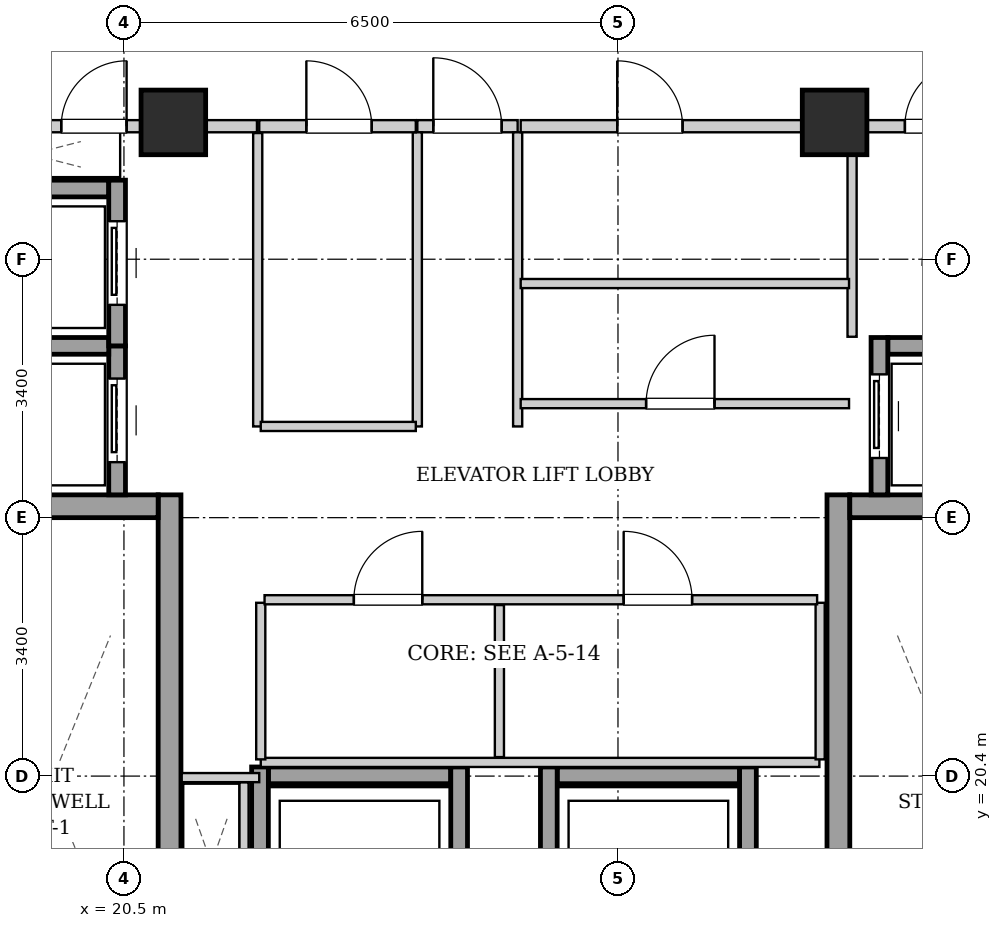
"""IFC4 building model, lengths in metres.
Left out: names, types, materials, properties, quantities, classifications, styles, units other than length and angle.
Written with IfcOpenShell. Run it as: python <this file> out.ifc"""

import sys

from ifc_helpers import new_model, si_unit, direction, frame, frame_2d, origin, origin_2d, place, context, subcontext, project, spatial, rectangle, extrude, element, fill, save


model = new_model("IFC4")
c1 = context("Model", 3, precision=1e-05, world=origin(), true_north=direction((0.0, 1.0)))
c2 = subcontext(c1, "Body", "Model", "MODEL_VIEW")
j1 = project(units=[si_unit("LENGTHUNIT", "METRE"), si_unit("PLANEANGLEUNIT", "RADIAN")], contexts=[c1])
p1 = place(None, origin())
s1 = spatial("IfcSite", under=j1, at=p1, CompositionType="ELEMENT")
p2 = place(p1, origin())
s2 = spatial("IfcBuilding", under=s1, at=p2, CompositionType="ELEMENT")
p3 = place(p2, frame((0.0, 0.0, 210.7)))
s3 = spatial("IfcBuildingStorey", under=s2, at=p3, CompositionType="ELEMENT", Elevation=210.7)
for number, where, z_axis, x_axis in (
    (1, (21.15, 29.0, 0.0), (0.0, 0.0, 1.0), (1.0, 0.0, 0.0)),
    (2, (29.85, 29.0, 0.0), (0.0, 0.0, 1.0), (1.0, 0.0, 0.0)),
):
    element("IfcColumn", number, at=place(p3, frame(where, z_axis=z_axis, x_axis=x_axis)), inside=s3, PredefinedType="COLUMN", context=c2, shape_type="SweptSolid", body=[
        extrude(rectangle(XDim=0.85, YDim=0.85, at=origin_2d()), origin(), (0.0, 0.0, 1.0), 3.3),
    ])
p4 = place(p3, frame((21.1, 15.1, 0.0), z_axis=(0.0, 0.0, 1.0), x_axis=(0.0, 1.0, 0.0)))
e3 = element("IfcWall", 3, at=p4, inside=s3, PredefinedType="SHEAR", context=c2, shape_type="SweptSolid", body=[
    extrude(rectangle(XDim=9.0, YDim=0.3, at=frame_2d((4.5, 0.0))), origin(), (0.0, 0.0, 1.0), 3.04),
])
p5 = place(p3, frame((18.1, 23.95, 0.0), z_axis=(0.0, 0.0, 1.0), x_axis=(1.0, 0.0, 0.0)))
e4 = element("IfcWall", 4, at=p5, inside=s3, PredefinedType="SHEAR", context=c2, shape_type="SweptSolid", body=[
    extrude(rectangle(XDim=2.85, YDim=0.3, at=frame_2d((1.425, 0.0))), origin(), (0.0, 0.0, 1.0), 3.04),
])
p6 = place(p3, frame((29.9, 15.1, 0.0), z_axis=(0.0, 0.0, 1.0), x_axis=(0.0, 1.0, 0.0)))
e5 = element("IfcWall", 5, at=p6, inside=s3, PredefinedType="SHEAR", context=c2, shape_type="SweptSolid", body=[
    extrude(rectangle(XDim=9.0, YDim=0.3, at=frame_2d((4.5, 0.0))), origin(), (0.0, 0.0, 1.0), 3.04),
])
p7 = place(p3, frame((30.05, 23.95, 0.0), z_axis=(0.0, 0.0, 1.0), x_axis=(1.0, 0.0, 0.0)))
e6 = element("IfcWall", 6, at=p7, inside=s3, PredefinedType="SHEAR", context=c2, shape_type="SweptSolid", body=[
    extrude(rectangle(XDim=2.85, YDim=0.3, at=frame_2d((1.425, 0.0))), origin(), (0.0, 0.0, 1.0), 3.04),
])
p8 = place(p3, frame((20.41, 24.1, 0.0), z_axis=(0.0, 0.0, 1.0), x_axis=(0.0, 1.0, 0.0)))
e7 = element("IfcWall", 7, at=p8, inside=s3, PredefinedType="SHEAR", context=c2, shape_type="SweptSolid", body=[
    extrude(rectangle(XDim=1.96, YDim=0.22, at=frame_2d((0.98, 0.0))), origin(), (0.0, 0.0, 1.0), 3.04),
])
p9 = place(p8, frame((0.43, 0.0, 0.0)))
e8 = element("IfcOpeningElement", 8, at=p9, cuts=e7, PredefinedType="OPENING", context=c2, shape_type="SweptSolid", body=[
    extrude(rectangle(XDim=1.1, YDim=2.15, at=frame_2d((0.55, 1.075))), frame((0.0, 0.12, 0.0), z_axis=(0.0, -1.0, 0.0), x_axis=(1.0, 0.0, 0.0)), (0.0, 0.0, 1.0), 0.24),
])
for number, where, z_axis, x_axis in (
    (9, (18.4, 26.06, 0.0), (0.0, 0.0, 1.0), (1.0, 0.0, 0.0)),
    (10, (18.4, 28.13, 0.0), (0.0, 0.0, 1.0), (1.0, 0.0, 0.0)),
):
    element("IfcWall", number, at=place(p3, frame(where, z_axis=z_axis, x_axis=x_axis)), inside=s3, PredefinedType="SHEAR", context=c2, shape_type="SweptSolid", body=[
        extrude(rectangle(XDim=1.9, YDim=0.22, at=frame_2d((0.95, 0.0))), origin(), (0.0, 0.0, 1.0), 3.04),
    ])
p10 = place(p3, frame((20.41, 26.06, 0.0), z_axis=(0.0, 0.0, 1.0), x_axis=(0.0, 1.0, 0.0)))
e11 = element("IfcWall", 11, at=p10, inside=s3, PredefinedType="SHEAR", context=c2, shape_type="SweptSolid", body=[
    extrude(rectangle(XDim=2.18, YDim=0.22, at=frame_2d((1.09, 0.0))), origin(), (0.0, 0.0, 1.0), 3.04),
])
p11 = place(p10, frame((0.54, 0.0, 0.0)))
e12 = element("IfcOpeningElement", 12, at=p11, cuts=e11, PredefinedType="OPENING", context=c2, shape_type="SweptSolid", body=[
    extrude(rectangle(XDim=1.1, YDim=2.15, at=frame_2d((0.55, 1.075))), frame((0.0, 0.12, 0.0), z_axis=(0.0, -1.0, 0.0), x_axis=(1.0, 0.0, 0.0)), (0.0, 0.0, 1.0), 0.24),
])
p12 = place(p3, frame((30.55, 26.06, 0.0), z_axis=(0.0, 0.0, 1.0), x_axis=(1.0, 0.0, 0.0)))
e13 = element("IfcWall", 13, at=p12, inside=s3, PredefinedType="SHEAR", context=c2, shape_type="SweptSolid", body=[
    extrude(rectangle(XDim=1.9, YDim=0.22, at=frame_2d((0.95, 0.0))), origin(), (0.0, 0.0, 1.0), 3.04),
])
p13 = place(p3, frame((30.44, 24.1, 0.0), z_axis=(0.0, 0.0, 1.0), x_axis=(0.0, 1.0, 0.0)))
e14 = element("IfcWall", 14, at=p13, inside=s3, PredefinedType="SHEAR", context=c2, shape_type="SweptSolid", body=[
    extrude(rectangle(XDim=2.07, YDim=0.22, at=frame_2d((1.035, 0.0))), origin(), (0.0, 0.0, 1.0), 3.04),
])
p14 = place(p13, frame((0.485, 0.0, 0.0)))
e15 = element("IfcOpeningElement", 15, at=p14, cuts=e14, PredefinedType="OPENING", context=c2, shape_type="SweptSolid", body=[
    extrude(rectangle(XDim=1.1, YDim=2.15, at=frame_2d((0.55, 1.075))), frame((0.0, 0.12, 0.0), z_axis=(0.0, -1.0, 0.0), x_axis=(1.0, 0.0, 0.0)), (0.0, 0.0, 1.0), 0.24),
])
p15 = place(p3, frame((22.4, 20.41, 0.0), z_axis=(0.0, 0.0, 1.0), x_axis=(1.0, 0.0, 0.0)))
e16 = element("IfcWall", 16, at=p15, inside=s3, PredefinedType="SHEAR", context=c2, shape_type="SweptSolid", body=[
    extrude(rectangle(XDim=2.4, YDim=0.22, at=frame_2d((1.2, 0.0))), origin(), (0.0, 0.0, 1.0), 3.04),
])
for number, where, z_axis, x_axis in (
    (17, (22.29, 17.98, 0.0), (0.0, 0.0, 1.0), (0.0, 1.0, 0.0)),
    (18, (24.91, 17.98, 0.0), (0.0, 0.0, 1.0), (0.0, 1.0, 0.0)),
):
    element("IfcWall", number, at=place(p3, frame(where, z_axis=z_axis, x_axis=x_axis)), inside=s3, PredefinedType="SHEAR", context=c2, shape_type="SweptSolid", body=[
        extrude(rectangle(XDim=2.54, YDim=0.22, at=frame_2d((1.27, 0.0))), origin(), (0.0, 0.0, 1.0), 3.04),
    ])
p16 = place(p3, frame((26.2, 20.41, 0.0), z_axis=(0.0, 0.0, 1.0), x_axis=(1.0, 0.0, 0.0)))
e19 = element("IfcWall", 19, at=p16, inside=s3, PredefinedType="SHEAR", context=c2, shape_type="SweptSolid", body=[
    extrude(rectangle(XDim=2.4, YDim=0.22, at=frame_2d((1.2, 0.0))), origin(), (0.0, 0.0, 1.0), 3.04),
])
for number, where, z_axis, x_axis in (
    (20, (26.09, 17.98, 0.0), (0.0, 0.0, 1.0), (0.0, 1.0, 0.0)),
    (21, (28.71, 17.98, 0.0), (0.0, 0.0, 1.0), (0.0, 1.0, 0.0)),
):
    element("IfcWall", number, at=place(p3, frame(where, z_axis=z_axis, x_axis=x_axis)), inside=s3, PredefinedType="SHEAR", context=c2, shape_type="SweptSolid", body=[
        extrude(rectangle(XDim=2.54, YDim=0.22, at=frame_2d((1.27, 0.0))), origin(), (0.0, 0.0, 1.0), 3.04),
    ])
p17 = place(p3, frame((24.36, 28.95, 0.0), z_axis=(0.0, 0.0, 1.0), x_axis=(1.0, 0.0, 0.0)))
e22 = element("IfcWall", 22, at=p17, inside=s3, PredefinedType="PARTITIONING", context=c2, shape_type="SweptSolid", body=[
    extrude(rectangle(XDim=1.32, YDim=0.16, at=frame_2d((0.66, 0.0))), origin(), (0.0, 0.0, 1.0), 2.556),
])
p18 = place(p17, frame((0.21, 0.0, 0.0)))
e23 = element("IfcOpeningElement", 23, at=p18, cuts=e22, PredefinedType="OPENING", context=c2, shape_type="SweptSolid", body=[
    extrude(rectangle(XDim=0.9, YDim=2.05, at=frame_2d((0.45, 1.025))), frame((0.0, 0.09, 0.0), z_axis=(0.0, -1.0, 0.0), x_axis=(1.0, 0.0, 0.0)), (0.0, 0.0, 1.0), 0.18),
])
p19 = place(p3, frame((17.96, 28.95, 0.0), z_axis=(0.0, 0.0, 1.0), x_axis=(1.0, 0.0, 0.0)))
e24 = element("IfcWall", 24, at=p19, inside=s3, PredefinedType="PARTITIONING", context=c2, shape_type="SweptSolid", body=[
    extrude(rectangle(XDim=4.29, YDim=0.16, at=frame_2d((2.145, 0.0))), origin(), (0.0, 0.0, 1.0), 2.556),
])
p20 = place(p19, frame((1.715, 0.0, 0.0)))
e25 = element("IfcOpeningElement", 25, at=p20, cuts=e24, PredefinedType="OPENING", context=c2, shape_type="SweptSolid", body=[
    extrude(rectangle(XDim=0.86, YDim=2.05, at=frame_2d((0.43, 1.025))), frame((0.0, 0.09, 0.0), z_axis=(0.0, -1.0, 0.0), x_axis=(1.0, 0.0, 0.0)), (0.0, 0.0, 1.0), 0.18),
])
p21 = place(p3, frame((22.08, 18.2, 0.0), z_axis=(0.0, 0.0, 1.0), x_axis=(0.0, 1.0, 0.0)))
e26 = element("IfcWall", 26, at=p21, inside=s3, PredefinedType="PARTITIONING", context=c2, shape_type="SweptSolid", body=[
    extrude(rectangle(XDim=2.12, YDim=0.12, at=frame_2d((1.06, 0.0))), origin(), (0.0, 0.0, 1.0), 3.04),
])
p22 = place(p3, frame((22.28, 20.38, 0.0), z_axis=(0.0, 0.0, 1.0), x_axis=(-1.0, 0.0, 0.0)))
e27 = element("IfcWall", 27, at=p22, inside=s3, PredefinedType="PARTITIONING", context=c2, shape_type="SweptSolid", body=[
    extrude(rectangle(XDim=1.02, YDim=0.12, at=frame_2d((0.51, 0.0))), origin(), (0.0, 0.0, 1.0), 3.04),
])
for number, where, z_axis, x_axis in (
    (28, (24.36, 25.0, 0.0), (0.0, 0.0, 1.0), (0.0, 1.0, 0.0)),
    (29, (25.68, 25.0, 0.0), (0.0, 0.0, 1.0), (0.0, 1.0, 0.0)),
):
    element("IfcWall", number, at=place(p3, frame(where, z_axis=z_axis, x_axis=x_axis)), inside=s3, PredefinedType="PARTITIONING", context=c2, shape_type="SweptSolid", body=[
        extrude(rectangle(XDim=3.87, YDim=0.12, at=frame_2d((1.935, 0.0))), origin(), (0.0, 0.0, 1.0), 3.04),
    ])
p23 = place(p3, frame((30.08, 26.18, 0.0), z_axis=(0.0, 0.0, 1.0), x_axis=(0.0, 1.0, 0.0)))
e30 = element("IfcWall", 30, at=p23, inside=s3, PredefinedType="PARTITIONING", context=c2, shape_type="SweptSolid", body=[
    extrude(rectangle(XDim=2.68, YDim=0.12, at=frame_2d((1.34, 0.0))), origin(), (0.0, 0.0, 1.0), 3.04),
])
p24 = place(p3, frame((30.08, 28.95, 0.0), z_axis=(0.0, 0.0, 1.0), x_axis=(1.0, 0.0, 0.0)))
e31 = element("IfcWall", 31, at=p24, inside=s3, PredefinedType="PARTITIONING", context=c2, shape_type="SweptSolid", body=[
    extrude(rectangle(XDim=2.96, YDim=0.16, at=frame_2d((1.48, 0.0))), origin(), (0.0, 0.0, 1.0), 3.04),
])
p25 = place(p24, frame((0.695, 0.0, 0.0)))
e32 = element("IfcOpeningElement", 32, at=p25, cuts=e31, PredefinedType="OPENING", context=c2, shape_type="SweptSolid", body=[
    extrude(rectangle(XDim=0.86, YDim=2.05, at=frame_2d((0.43, 1.025))), frame((0.0, 0.09, 0.0), z_axis=(0.0, -1.0, 0.0), x_axis=(1.0, 0.0, 0.0)), (0.0, 0.0, 1.0), 0.18),
])
p26 = place(p3, frame((22.26, 25.0, 0.0), z_axis=(0.0, 0.0, 1.0), x_axis=(0.0, 1.0, 0.0)))
e33 = element("IfcWall", 33, at=p26, inside=s3, PredefinedType="PARTITIONING", context=c2, shape_type="SweptSolid", body=[
    extrude(rectangle(XDim=3.86, YDim=0.12, at=frame_2d((1.93, 0.0))), origin(), (0.0, 0.0, 1.0), 3.04),
])
p27 = place(p3, frame((22.3, 25.0, 0.0), z_axis=(0.0, 0.0, 1.0), x_axis=(1.0, 0.0, 0.0)))
e34 = element("IfcWall", 34, at=p27, inside=s3, PredefinedType="PARTITIONING", context=c2, shape_type="SweptSolid", body=[
    extrude(rectangle(XDim=2.04, YDim=0.12, at=frame_2d((1.02, 0.0))), origin(), (0.0, 0.0, 1.0), 3.04),
])
p28 = place(p3, frame((22.28, 28.95, 0.0), z_axis=(0.0, 0.0, 1.0), x_axis=(1.0, 0.0, 0.0)))
e35 = element("IfcWall", 35, at=p28, inside=s3, PredefinedType="PARTITIONING", context=c2, shape_type="SweptSolid", body=[
    extrude(rectangle(XDim=2.06, YDim=0.16, at=frame_2d((1.03, 0.0))), origin(), (0.0, 0.0, 1.0), 2.556),
])
p29 = place(p28, frame((0.62, 0.0, 0.0)))
e36 = element("IfcOpeningElement", 36, at=p29, cuts=e35, PredefinedType="OPENING", context=c2, shape_type="SweptSolid", body=[
    extrude(rectangle(XDim=0.86, YDim=2.05, at=frame_2d((0.43, 1.025))), frame((0.0, 0.09, 0.0), z_axis=(0.0, -1.0, 0.0), x_axis=(1.0, 0.0, 0.0)), (0.0, 0.0, 1.0), 0.18),
])
p30 = place(p3, frame((25.72, 26.88, 0.0), z_axis=(0.0, 0.0, 1.0), x_axis=(1.0, 0.0, 0.0)))
e37 = element("IfcWall", 37, at=p30, inside=s3, PredefinedType="PARTITIONING", context=c2, shape_type="SweptSolid", body=[
    extrude(rectangle(XDim=4.32, YDim=0.12, at=frame_2d((2.16, 0.0))), origin(), (0.0, 0.0, 1.0), 3.04),
])
p31 = place(p3, frame((25.72, 25.3, 0.0), z_axis=(0.0, 0.0, 1.0), x_axis=(1.0, 0.0, 0.0)))
e38 = element("IfcWall", 38, at=p31, inside=s3, PredefinedType="PARTITIONING", context=c2, shape_type="SweptSolid", body=[
    extrude(rectangle(XDim=4.32, YDim=0.12, at=frame_2d((2.16, 0.0))), origin(), (0.0, 0.0, 1.0), 3.04),
])
p32 = place(p31, frame((1.65, 0.0, 0.0)))
e39 = element("IfcOpeningElement", 39, at=p32, cuts=e38, PredefinedType="OPENING", context=c2, shape_type="SweptSolid", body=[
    extrude(rectangle(XDim=0.9, YDim=2.05, at=frame_2d((0.45, 1.025))), frame((0.0, 0.07, 0.0), z_axis=(0.0, -1.0, 0.0), x_axis=(1.0, 0.0, 0.0)), (0.0, 0.0, 1.0), 0.14),
])
p33 = place(p3, frame((25.72, 28.95, 0.0), z_axis=(0.0, 0.0, 1.0), x_axis=(1.0, 0.0, 0.0)))
e40 = element("IfcWall", 40, at=p33, inside=s3, PredefinedType="PARTITIONING", context=c2, shape_type="SweptSolid", body=[
    extrude(rectangle(XDim=4.32, YDim=0.16, at=frame_2d((2.16, 0.0))), origin(), (0.0, 0.0, 1.0), 2.556),
])
p34 = place(p33, frame((1.27, 0.0, 0.0)))
e41 = element("IfcOpeningElement", 41, at=p34, cuts=e40, PredefinedType="OPENING", context=c2, shape_type="SweptSolid", body=[
    extrude(rectangle(XDim=0.86, YDim=2.05, at=frame_2d((0.43, 1.025))), frame((0.0, 0.09, 0.0), z_axis=(0.0, -1.0, 0.0), x_axis=(1.0, 0.0, 0.0)), (0.0, 0.0, 1.0), 0.18),
])
p35 = place(p3, frame((22.3, 20.58, 0.0), z_axis=(0.0, 0.0, 1.0), x_axis=(1.0, 0.0, 0.0)))
e42 = element("IfcWall", 42, at=p35, inside=s3, PredefinedType="PARTITIONING", context=c2, shape_type="SweptSolid", body=[
    extrude(rectangle(XDim=7.35, YDim=0.12, at=frame_2d((3.675, 0.0))), origin(), (0.0, 0.0, 1.0), 3.04),
])
for number, where, z_axis, x_axis in (
    (43, (22.3, 20.62, 0.0), (0.0, 0.0, 1.0), (0.0, 1.0, 0.0)),
    (44, (29.66, 20.62, 0.0), (0.0, 0.0, 1.0), (0.0, 1.0, 0.0)),
):
    element("IfcWall", number, at=place(p3, frame(where, z_axis=z_axis, x_axis=x_axis)), inside=s3, PredefinedType="PARTITIONING", context=c2, shape_type="SweptSolid", body=[
        extrude(rectangle(XDim=2.06, YDim=0.12, at=frame_2d((1.03, 0.0))), origin(), (0.0, 0.0, 1.0), 3.04),
    ])
p36 = place(p3, frame((25.44, 20.65, 0.0), z_axis=(0.0, 0.0, 1.0), x_axis=(0.0, 1.0, 0.0)))
e45 = element("IfcWall", 45, at=p36, inside=s3, PredefinedType="PARTITIONING", context=c2, shape_type="SweptSolid", body=[
    extrude(rectangle(XDim=2.0, YDim=0.12, at=frame_2d((1.0, 0.0))), origin(), (0.0, 0.0, 1.0), 3.04),
])
p37 = place(p3, frame((22.35, 22.72, 0.0), z_axis=(0.0, 0.0, 1.0), x_axis=(1.0, 0.0, 0.0)))
e46 = element("IfcWall", 46, at=p37, inside=s3, PredefinedType="PARTITIONING", context=c2, shape_type="SweptSolid", body=[
    extrude(rectangle(XDim=7.27, YDim=0.12, at=frame_2d((3.635, 0.0))), origin(), (0.0, 0.0, 1.0), 3.04),
])
p38 = place(p37, frame((1.175, 0.0, 0.0)))
e47 = element("IfcOpeningElement", 47, at=p38, cuts=e46, PredefinedType="OPENING", context=c2, shape_type="SweptSolid", body=[
    extrude(rectangle(XDim=0.9, YDim=2.05, at=frame_2d((0.45, 1.025))), frame((0.0, 0.07, 0.0), z_axis=(0.0, -1.0, 0.0), x_axis=(1.0, 0.0, 0.0)), (0.0, 0.0, 1.0), 0.14),
])
p39 = place(p37, frame((4.725, 0.0, 0.0)))
e48 = element("IfcOpeningElement", 48, at=p39, cuts=e46, PredefinedType="OPENING", context=c2, shape_type="SweptSolid", body=[
    extrude(rectangle(XDim=0.9, YDim=2.05, at=frame_2d((0.45, 1.025))), frame((0.0, 0.07, 0.0), z_axis=(0.0, -1.0, 0.0), x_axis=(1.0, 0.0, 0.0)), (0.0, 0.0, 1.0), 0.14),
])
p40 = place(p9, origin())
e49 = element("IfcDoor", 49, at=p40, inside=s3, OperationType="SLIDING_TO_LEFT", PredefinedType="DOOR", context=c2, shape_type="SweptSolid", body=[
    extrude(rectangle(XDim=1.1, YDim=2.15, at=frame_2d((0.55, 1.075))), frame((0.0, 0.025, 0.0), z_axis=(0.0, -1.0, 0.0), x_axis=(1.0, 0.0, 0.0)), (0.0, 0.0, 1.0), 0.05),
])
fill(e8, e49)
p41 = place(p11, origin())
e50 = element("IfcDoor", 50, at=p41, inside=s3, OperationType="SLIDING_TO_LEFT", PredefinedType="DOOR", context=c2, shape_type="SweptSolid", body=[
    extrude(rectangle(XDim=1.1, YDim=2.15, at=frame_2d((0.55, 1.075))), frame((0.0, 0.025, 0.0), z_axis=(0.0, -1.0, 0.0), x_axis=(1.0, 0.0, 0.0)), (0.0, 0.0, 1.0), 0.05),
])
fill(e12, e50)
p42 = place(p14, origin())
e51 = element("IfcDoor", 51, at=p42, inside=s3, OperationType="SLIDING_TO_LEFT", PredefinedType="DOOR", context=c2, shape_type="SweptSolid", body=[
    extrude(rectangle(XDim=1.1, YDim=2.15, at=frame_2d((0.55, 1.075))), frame((0.0, 0.025, 0.0), z_axis=(0.0, -1.0, 0.0), x_axis=(1.0, 0.0, 0.0)), (0.0, 0.0, 1.0), 0.05),
])
fill(e15, e51)
p43 = place(p18, origin())
e52 = element("IfcDoor", 52, at=p43, inside=s3, OperationType="SINGLE_SWING_LEFT", PredefinedType="DOOR", context=c2, shape_type="SweptSolid", body=[
    extrude(rectangle(XDim=0.9, YDim=2.05, at=frame_2d((0.45, 1.025))), frame((0.0, 0.025, 0.0), z_axis=(0.0, -1.0, 0.0), x_axis=(1.0, 0.0, 0.0)), (0.0, 0.0, 1.0), 0.05),
])
fill(e23, e52)
p44 = place(p20, origin())
e53 = element("IfcDoor", 53, at=p44, inside=s3, OperationType="SINGLE_SWING_RIGHT", PredefinedType="DOOR", context=c2, shape_type="SweptSolid", body=[
    extrude(rectangle(XDim=0.86, YDim=2.05, at=frame_2d((0.43, 1.025))), frame((0.0, 0.025, 0.0), z_axis=(0.0, -1.0, 0.0), x_axis=(1.0, 0.0, 0.0)), (0.0, 0.0, 1.0), 0.05),
])
fill(e25, e53)
p45 = place(p25, origin())
e54 = element("IfcDoor", 54, at=p45, inside=s3, OperationType="SINGLE_SWING_RIGHT", PredefinedType="DOOR", context=c2, shape_type="SweptSolid", body=[
    extrude(rectangle(XDim=0.86, YDim=2.05, at=frame_2d((0.43, 1.025))), frame((0.0, 0.025, 0.0), z_axis=(0.0, -1.0, 0.0), x_axis=(1.0, 0.0, 0.0)), (0.0, 0.0, 1.0), 0.05),
])
fill(e32, e54)
p46 = place(p29, origin())
e55 = element("IfcDoor", 55, at=p46, inside=s3, OperationType="SINGLE_SWING_LEFT", PredefinedType="DOOR", context=c2, shape_type="SweptSolid", body=[
    extrude(rectangle(XDim=0.86, YDim=2.05, at=frame_2d((0.43, 1.025))), frame((0.0, 0.025, 0.0), z_axis=(0.0, -1.0, 0.0), x_axis=(1.0, 0.0, 0.0)), (0.0, 0.0, 1.0), 0.05),
])
fill(e36, e55)
p47 = place(p32, origin())
e56 = element("IfcDoor", 56, at=p47, inside=s3, OperationType="SINGLE_SWING_RIGHT", PredefinedType="DOOR", context=c2, shape_type="SweptSolid", body=[
    extrude(rectangle(XDim=0.9, YDim=2.05, at=frame_2d((0.45, 1.025))), frame((0.0, 0.025, 0.0), z_axis=(0.0, -1.0, 0.0), x_axis=(1.0, 0.0, 0.0)), (0.0, 0.0, 1.0), 0.05),
])
fill(e39, e56)
p48 = place(p34, origin())
e57 = element("IfcDoor", 57, at=p48, inside=s3, OperationType="SINGLE_SWING_LEFT", PredefinedType="DOOR", context=c2, shape_type="SweptSolid", body=[
    extrude(rectangle(XDim=0.86, YDim=2.05, at=frame_2d((0.43, 1.025))), frame((0.0, 0.025, 0.0), z_axis=(0.0, -1.0, 0.0), x_axis=(1.0, 0.0, 0.0)), (0.0, 0.0, 1.0), 0.05),
])
fill(e41, e57)
p49 = place(p38, origin())
e58 = element("IfcDoor", 58, at=p49, inside=s3, OperationType="SINGLE_SWING_RIGHT", PredefinedType="DOOR", context=c2, shape_type="SweptSolid", body=[
    extrude(rectangle(XDim=0.9, YDim=2.05, at=frame_2d((0.45, 1.025))), frame((0.0, 0.025, 0.0), z_axis=(0.0, -1.0, 0.0), x_axis=(1.0, 0.0, 0.0)), (0.0, 0.0, 1.0), 0.05),
])
fill(e47, e58)
p50 = place(p39, origin())
e59 = element("IfcDoor", 59, at=p50, inside=s3, OperationType="SINGLE_SWING_LEFT", PredefinedType="DOOR", context=c2, shape_type="SweptSolid", body=[
    extrude(rectangle(XDim=0.9, YDim=2.05, at=frame_2d((0.45, 1.025))), frame((0.0, 0.025, 0.0), z_axis=(0.0, -1.0, 0.0), x_axis=(1.0, 0.0, 0.0)), (0.0, 0.0, 1.0), 0.05),
])
fill(e48, e59)
save(model, sys.argv[1])
